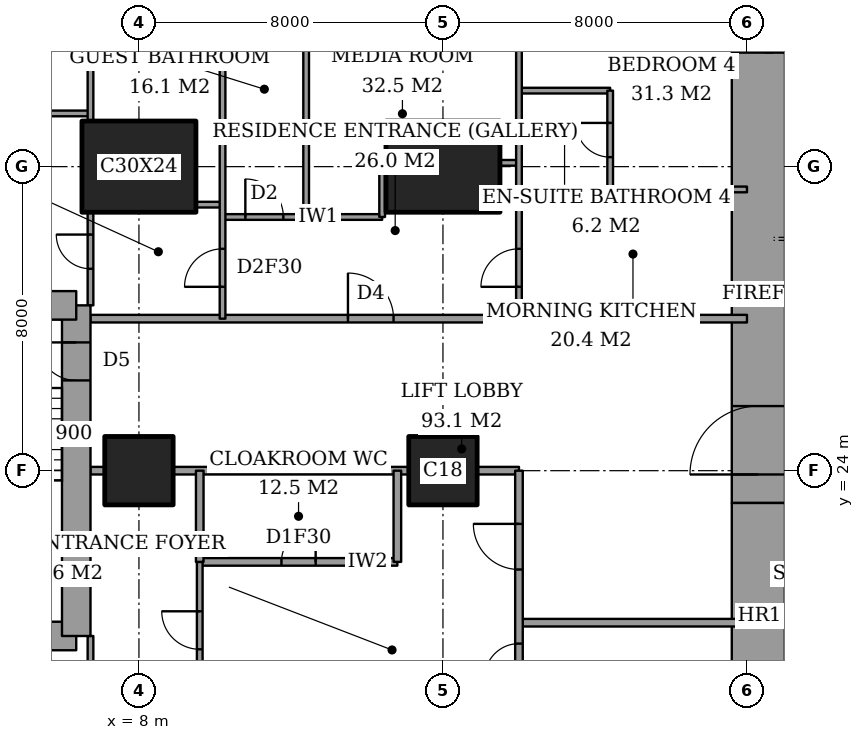
"""IFC4 building model, lengths in metres.
Left out: names, types, materials, properties, quantities, classifications, styles, units other than length and angle.
Written with IfcOpenShell. Run it as: python <this file> out.ifc"""

import sys

from ifc_helpers import new_model, si_unit, direction, frame, frame_2d, origin, origin_2d, place, context, subcontext, project, spatial, rectangle, extrude, element, fill, save


model = new_model("IFC4")
c1 = context("Model", 3, precision=1e-05, world=origin(), true_north=direction((0.0, 1.0)))
c2 = subcontext(c1, "Body", "Model", "MODEL_VIEW")
j1 = project(units=[si_unit("LENGTHUNIT", "METRE"), si_unit("PLANEANGLEUNIT", "RADIAN")], contexts=[c1])
p1 = place(None, origin())
s1 = spatial("IfcSite", under=j1, at=p1, CompositionType="ELEMENT")
p2 = place(p1, origin())
s2 = spatial("IfcBuilding", under=s1, at=p2, CompositionType="ELEMENT")
p3 = place(p2, frame((0.0, 0.0, 196.6)))
s3 = spatial("IfcBuildingStorey", under=s2, at=p3, CompositionType="ELEMENT", Elevation=196.6)
p4 = place(p3, frame((8.0, 24.0, 0.0), z_axis=(0.0, 0.0, 1.0), x_axis=(1.0, 0.0, 0.0)))
e1 = element("IfcColumn", 1, at=p4, inside=s3, PredefinedType="COLUMN", context=c2, shape_type="SweptSolid", body=[
    extrude(rectangle(XDim=1.8, YDim=1.8, at=origin_2d()), origin(), (0.0, 0.0, 1.0), 3.6),
])
p5 = place(p3, frame((8.0, 32.0, 0.0), z_axis=(0.0, 0.0, 1.0), x_axis=(1.0, 0.0, 0.0)))
e2 = element("IfcColumn", 2, at=p5, inside=s3, PredefinedType="COLUMN", context=c2, shape_type="SweptSolid", body=[
    extrude(rectangle(XDim=3.0, YDim=2.4, at=origin_2d()), origin(), (0.0, 0.0, 1.0), 3.6),
])
p6 = place(p3, frame((16.0, 24.0, 0.0), z_axis=(0.0, 0.0, 1.0), x_axis=(1.0, 0.0, 0.0)))
e3 = element("IfcColumn", 3, at=p6, inside=s3, PredefinedType="COLUMN", context=c2, shape_type="SweptSolid", body=[
    extrude(rectangle(XDim=1.8, YDim=1.8, at=origin_2d()), origin(), (0.0, 0.0, 1.0), 3.6),
])
p7 = place(p3, frame((16.0, 32.0, 0.0), z_axis=(0.0, 0.0, 1.0), x_axis=(1.0, 0.0, 0.0)))
e4 = element("IfcColumn", 4, at=p7, inside=s3, PredefinedType="COLUMN", context=c2, shape_type="SweptSolid", body=[
    extrude(rectangle(XDim=3.0, YDim=2.4, at=origin_2d()), origin(), (0.0, 0.0, 1.0), 3.6),
])
p8 = place(p3, frame((24.3, 13.0, 0.0), z_axis=(0.0, 0.0, 1.0), x_axis=(0.0, 1.0, 0.0)))
e5 = element("IfcWall", 5, at=p8, inside=s3, PredefinedType="SHEAR", context=c2, shape_type="SweptSolid", body=[
    extrude(rectangle(XDim=10.15, YDim=1.4, at=frame_2d((5.075, 0.0))), origin(), (0.0, 0.0, 1.0), 3.6),
])
p9 = place(p3, frame((24.3, 23.15, 0.0), z_axis=(0.0, 0.0, 1.0), x_axis=(0.0, 1.0, 0.0)))
e6 = element("IfcWall", 6, at=p9, inside=s3, PredefinedType="SHEAR", context=c2, shape_type="SweptSolid", body=[
    extrude(rectangle(XDim=11.85, YDim=1.4, at=frame_2d((5.925, 0.0))), origin(), (0.0, 0.0, 1.0), 3.6),
])
p10 = place(p9, frame((0.75, 0.0, 0.0)))
e7 = element("IfcOpeningElement", 7, at=p10, cuts=e6, PredefinedType="OPENING", context=c2, shape_type="SweptSolid", body=[
    extrude(rectangle(XDim=1.8, YDim=2.4, at=frame_2d((0.9, 1.2))), frame((0.0, 0.71, 0.0), z_axis=(0.0, -1.0, 0.0), x_axis=(1.0, 0.0, 0.0)), (0.0, 0.0, 1.0), 1.42),
])
p11 = place(p3, frame((1.9, 19.65, 0.0), z_axis=(0.0, 0.0, 1.0), x_axis=(1.0, 0.0, 0.0)))
e8 = element("IfcWall", 8, at=p11, inside=s3, PredefinedType="SHEAR", context=c2, shape_type="SweptSolid", body=[
    extrude(rectangle(XDim=4.45, YDim=0.75, at=frame_2d((2.225, 0.0))), origin(), (0.0, 0.0, 1.0), 3.6),
])
p12 = place(p3, frame((6.35, 19.65, 0.0), z_axis=(0.0, 0.0, 1.0), x_axis=(0.0, 1.0, 0.0)))
e9 = element("IfcWall", 9, at=p12, inside=s3, PredefinedType="SHEAR", context=c2, shape_type="SweptSolid", body=[
    extrude(rectangle(XDim=8.7, YDim=0.75, at=frame_2d((4.35, 0.0))), origin(), (0.0, 0.0, 1.0), 3.6),
])
p13 = place(p12, frame((6.725, 0.0, 0.0)))
e10 = element("IfcOpeningElement", 10, at=p13, cuts=e9, PredefinedType="OPENING", context=c2, shape_type="SweptSolid", body=[
    extrude(rectangle(XDim=1.0, YDim=2.1, at=frame_2d((0.5, 1.05))), frame((0.0, 0.385, 0.0), z_axis=(0.0, -1.0, 0.0), x_axis=(1.0, 0.0, 0.0)), (0.0, 0.0, 1.0), 0.77),
])
p14 = place(p3, frame((6.35, 28.35, 0.0), z_axis=(0.0, 0.0, 1.0), x_axis=(-1.0, 0.0, 0.0)))
e11 = element("IfcWall", 11, at=p14, inside=s3, PredefinedType="SHEAR", context=c2, shape_type="SweptSolid", body=[
    extrude(rectangle(XDim=4.45, YDim=0.75, at=frame_2d((2.225, 0.0))), origin(), (0.0, 0.0, 1.0), 3.6),
])
p15 = place(p3, frame((18.0, 20.0, 0.0), z_axis=(0.0, 0.0, 1.0), x_axis=(1.0, 0.0, 0.0)))
e12 = element("IfcWall", 12, at=p15, inside=s3, PredefinedType="PARTITIONING", context=c2, shape_type="SweptSolid", body=[
    extrude(rectangle(XDim=6.0, YDim=0.2, at=frame_2d((3.0, 0.0))), origin(), (0.0, 0.0, 1.0), 3.35),
])
p16 = place(p3, frame((9.6, 21.6, 0.0), z_axis=(0.0, 0.0, 1.0), x_axis=(1.0, 0.0, 0.0)))
e13 = element("IfcWall", 13, at=p16, inside=s3, PredefinedType="PARTITIONING", context=c2, shape_type="SweptSolid", body=[
    extrude(rectangle(XDim=5.2, YDim=0.2, at=frame_2d((2.6, 0.0))), origin(), (0.0, 0.0, 1.0), 3.35),
])
p17 = place(p16, frame((2.15, 0.0, 0.0)))
e14 = element("IfcOpeningElement", 14, at=p17, cuts=e13, PredefinedType="OPENING", context=c2, shape_type="SweptSolid", body=[
    extrude(rectangle(XDim=0.9, YDim=2.1, at=frame_2d((0.45, 1.05))), frame((0.0, 0.11, 0.0), z_axis=(0.0, -1.0, 0.0), x_axis=(1.0, 0.0, 0.0)), (0.0, 0.0, 1.0), 0.22),
])
p18 = place(p3, frame((6.725, 24.0, 0.0), z_axis=(0.0, 0.0, 1.0), x_axis=(1.0, 0.0, 0.0)))
e15 = element("IfcWall", 15, at=p18, inside=s3, PredefinedType="PARTITIONING", context=c2, shape_type="SweptSolid", body=[
    extrude(rectangle(XDim=0.375, YDim=0.2, at=frame_2d((0.188, 0.0))), origin(), (0.0, 0.0, 1.0), 3.35),
])
p19 = place(p3, frame((8.9, 24.0, 0.0), z_axis=(0.0, 0.0, 1.0), x_axis=(1.0, 0.0, 0.0)))
e16 = element("IfcWall", 16, at=p19, inside=s3, PredefinedType="PARTITIONING", context=c2, shape_type="SweptSolid", body=[
    extrude(rectangle(XDim=6.2, YDim=0.2, at=frame_2d((3.1, 0.0))), origin(), (0.0, 0.0, 1.0), 3.35),
])
p20 = place(p3, frame((16.9, 24.0, 0.0), z_axis=(0.0, 0.0, 1.0), x_axis=(1.0, 0.0, 0.0)))
e17 = element("IfcWall", 17, at=p20, inside=s3, PredefinedType="PARTITIONING", context=c2, shape_type="SweptSolid", body=[
    extrude(rectangle(XDim=1.1, YDim=0.2, at=frame_2d((0.55, 0.0))), origin(), (0.0, 0.0, 1.0), 3.35),
])
p21 = place(p3, frame((6.725, 28.0, 0.0), z_axis=(0.0, 0.0, 1.0), x_axis=(1.0, 0.0, 0.0)))
e18 = element("IfcWall", 18, at=p21, inside=s3, PredefinedType="PARTITIONING", context=c2, shape_type="SweptSolid", body=[
    extrude(rectangle(XDim=17.275, YDim=0.2, at=frame_2d((8.637, 0.0))), origin(), (0.0, 0.0, 1.0), 3.35),
])
p22 = place(p21, frame((6.775, 0.0, 0.0)))
e19 = element("IfcOpeningElement", 19, at=p22, cuts=e18, PredefinedType="OPENING", context=c2, shape_type="SweptSolid", body=[
    extrude(rectangle(XDim=1.2, YDim=2.4, at=frame_2d((0.6, 1.2))), frame((0.0, 0.11, 0.0), z_axis=(0.0, -1.0, 0.0), x_axis=(1.0, 0.0, 0.0)), (0.0, 0.0, 1.0), 0.22),
])
p23 = place(p3, frame((10.2, 30.675, 0.0), z_axis=(0.0, 0.0, 1.0), x_axis=(1.0, 0.0, 0.0)))
e20 = element("IfcWall", 20, at=p23, inside=s3, PredefinedType="PARTITIONING", context=c2, shape_type="SweptSolid", body=[
    extrude(rectangle(XDim=4.2, YDim=0.15, at=frame_2d((2.1, 0.0))), origin(), (0.0, 0.0, 1.0), 3.35),
])
p24 = place(p23, frame((0.6, 0.0, 0.0)))
e21 = element("IfcOpeningElement", 21, at=p24, cuts=e20, PredefinedType="OPENING", context=c2, shape_type="SweptSolid", body=[
    extrude(rectangle(XDim=1.0, YDim=2.1, at=frame_2d((0.5, 1.05))), frame((0.0, 0.085, 0.0), z_axis=(0.0, -1.0, 0.0), x_axis=(1.0, 0.0, 0.0)), (0.0, 0.0, 1.0), 0.17),
])
p25 = place(p3, frame((9.5, 31.0, 0.0), z_axis=(0.0, 0.0, 1.0), x_axis=(1.0, 0.0, 0.0)))
e22 = element("IfcWall", 22, at=p25, inside=s3, PredefinedType="PARTITIONING", context=c2, shape_type="SweptSolid", body=[
    extrude(rectangle(XDim=0.7, YDim=0.15, at=frame_2d((0.35, 0.0))), origin(), (0.0, 0.0, 1.0), 3.35),
])
p26 = place(p3, frame((18.0, 31.4, 0.0), z_axis=(0.0, 0.0, 1.0), x_axis=(1.0, 0.0, 0.0)))
e23 = element("IfcWall", 23, at=p26, inside=s3, PredefinedType="PARTITIONING", context=c2, shape_type="SweptSolid", body=[
    extrude(rectangle(XDim=6.0, YDim=0.15, at=frame_2d((3.0, 0.0))), origin(), (0.0, 0.0, 1.0), 3.35),
])
p27 = place(p3, frame((17.5, 32.1, 0.0), z_axis=(0.0, 0.0, 1.0), x_axis=(1.0, 0.0, 0.0)))
e24 = element("IfcWall", 24, at=p27, inside=s3, PredefinedType="PARTITIONING", context=c2, shape_type="SweptSolid", body=[
    extrude(rectangle(XDim=0.5, YDim=0.15, at=frame_2d((0.25, 0.0))), origin(), (0.0, 0.0, 1.0), 3.35),
])
p28 = place(p3, frame((-0.45, 33.4, 0.0), z_axis=(0.0, 0.0, 1.0), x_axis=(1.0, 0.0, 0.0)))
e25 = element("IfcWall", 25, at=p28, inside=s3, PredefinedType="PARTITIONING", context=c2, shape_type="SweptSolid", body=[
    extrude(rectangle(XDim=7.175, YDim=0.15, at=frame_2d((3.587, 0.0))), origin(), (0.0, 0.0, 1.0), 3.35),
])
p29 = place(p3, frame((18.0, 34.0, 0.0), z_axis=(0.0, 0.0, 1.0), x_axis=(1.0, 0.0, 0.0)))
e26 = element("IfcWall", 26, at=p29, inside=s3, PredefinedType="PARTITIONING", context=c2, shape_type="SweptSolid", body=[
    extrude(rectangle(XDim=2.4, YDim=0.15, at=frame_2d((1.2, 0.0))), origin(), (0.0, 0.0, 1.0), 3.35),
])
p30 = place(p3, frame((6.725, 17.2, 0.0), z_axis=(0.0, 0.0, 1.0), x_axis=(0.0, 1.0, 0.0)))
e27 = element("IfcWall", 27, at=p30, inside=s3, PredefinedType="PARTITIONING", context=c2, shape_type="SweptSolid", body=[
    extrude(rectangle(XDim=2.45, YDim=0.15, at=frame_2d((1.225, 0.0))), origin(), (0.0, 0.0, 1.0), 3.35),
])
p31 = place(p30, frame((0.587, 0.0, 0.0)))
e28 = element("IfcOpeningElement", 28, at=p31, cuts=e27, PredefinedType="OPENING", context=c2, shape_type="SweptSolid", body=[
    extrude(rectangle(XDim=0.9, YDim=2.1, at=frame_2d((0.45, 1.05))), frame((0.0, 0.085, 0.0), z_axis=(0.0, -1.0, 0.0), x_axis=(1.0, 0.0, 0.0)), (0.0, 0.0, 1.0), 0.17),
])
p32 = place(p3, frame((6.725, 28.35, 0.0), z_axis=(0.0, 0.0, 1.0), x_axis=(0.0, 1.0, 0.0)))
e29 = element("IfcWall", 29, at=p32, inside=s3, PredefinedType="PARTITIONING", context=c2, shape_type="SweptSolid", body=[
    extrude(rectangle(XDim=2.45, YDim=0.15, at=frame_2d((1.225, 0.0))), origin(), (0.0, 0.0, 1.0), 3.35),
])
p33 = place(p32, frame((0.962, 0.0, 0.0)))
e30 = element("IfcOpeningElement", 30, at=p33, cuts=e29, PredefinedType="OPENING", context=c2, shape_type="SweptSolid", body=[
    extrude(rectangle(XDim=0.9, YDim=2.1, at=frame_2d((0.45, 1.05))), frame((0.0, 0.085, 0.0), z_axis=(0.0, -1.0, 0.0), x_axis=(1.0, 0.0, 0.0)), (0.0, 0.0, 1.0), 0.17),
])
p34 = place(p3, frame((6.725, 33.2, 0.0), z_axis=(0.0, 0.0, 1.0), x_axis=(0.0, 1.0, 0.0)))
e31 = element("IfcWall", 31, at=p34, inside=s3, PredefinedType="PARTITIONING", context=c2, shape_type="SweptSolid", body=[
    extrude(rectangle(XDim=4.2, YDim=0.15, at=frame_2d((2.1, 0.0))), origin(), (0.0, 0.0, 1.0), 3.35),
])
p35 = place(p3, frame((9.6, 21.6, 0.0), z_axis=(0.0, 0.0, 1.0), x_axis=(0.0, 1.0, 0.0)))
e32 = element("IfcWall", 32, at=p35, inside=s3, PredefinedType="PARTITIONING", context=c2, shape_type="SweptSolid", body=[
    extrude(rectangle(XDim=2.4, YDim=0.2, at=frame_2d((1.2, 0.0))), origin(), (0.0, 0.0, 1.0), 3.35),
])
p36 = place(p3, frame((9.6, 10.6, 0.0), z_axis=(0.0, 0.0, 1.0), x_axis=(0.0, 1.0, 0.0)))
e33 = element("IfcWall", 33, at=p36, inside=s3, PredefinedType="PARTITIONING", context=c2, shape_type="SweptSolid", body=[
    extrude(rectangle(XDim=11.0, YDim=0.15, at=frame_2d((5.5, 0.0))), origin(), (0.0, 0.0, 1.0), 3.35),
])
p37 = place(p36, frame((8.7, 0.0, 0.0)))
e34 = element("IfcOpeningElement", 34, at=p37, cuts=e33, PredefinedType="OPENING", context=c2, shape_type="SweptSolid", body=[
    extrude(rectangle(XDim=1.0, YDim=2.1, at=frame_2d((0.5, 1.05))), frame((0.0, 0.085, 0.0), z_axis=(0.0, -1.0, 0.0), x_axis=(1.0, 0.0, 0.0)), (0.0, 0.0, 1.0), 0.17),
])
p38 = place(p3, frame((10.2, 28.0, 0.0), z_axis=(0.0, 0.0, 1.0), x_axis=(0.0, 1.0, 0.0)))
e35 = element("IfcWall", 35, at=p38, inside=s3, PredefinedType="PARTITIONING", context=c2, shape_type="SweptSolid", body=[
    extrude(rectangle(XDim=9.4, YDim=0.15, at=frame_2d((4.7, 0.0))), origin(), (0.0, 0.0, 1.0), 3.35),
])
p39 = place(p38, frame((0.837, 0.0, 0.0)))
e36 = element("IfcOpeningElement", 36, at=p39, cuts=e35, PredefinedType="OPENING", context=c2, shape_type="SweptSolid", body=[
    extrude(rectangle(XDim=1.0, YDim=2.1, at=frame_2d((0.5, 1.05))), frame((0.0, 0.085, 0.0), z_axis=(0.0, -1.0, 0.0), x_axis=(1.0, 0.0, 0.0)), (0.0, 0.0, 1.0), 0.17),
])
p40 = place(p3, frame((12.4, 30.675, 0.0), z_axis=(0.0, 0.0, 1.0), x_axis=(0.0, 1.0, 0.0)))
e37 = element("IfcWall", 37, at=p40, inside=s3, PredefinedType="PARTITIONING", context=c2, shape_type="SweptSolid", body=[
    extrude(rectangle(XDim=6.725, YDim=0.15, at=frame_2d((3.362, 0.0))), origin(), (0.0, 0.0, 1.0), 3.35),
])
p41 = place(p3, frame((14.4, 30.675, 0.0), z_axis=(0.0, 0.0, 1.0), x_axis=(0.0, 1.0, 0.0)))
e38 = element("IfcWall", 38, at=p41, inside=s3, PredefinedType="PARTITIONING", context=c2, shape_type="SweptSolid", body=[
    extrude(rectangle(XDim=1.425, YDim=0.15, at=frame_2d((0.712, 0.0))), origin(), (0.0, 0.0, 1.0), 3.35),
])
p42 = place(p3, frame((14.8, 21.6, 0.0), z_axis=(0.0, 0.0, 1.0), x_axis=(0.0, 1.0, 0.0)))
e39 = element("IfcWall", 39, at=p42, inside=s3, PredefinedType="PARTITIONING", context=c2, shape_type="SweptSolid", body=[
    extrude(rectangle(XDim=2.4, YDim=0.2, at=frame_2d((1.2, 0.0))), origin(), (0.0, 0.0, 1.0), 3.35),
])
p43 = place(p3, frame((18.0, 18.0, 0.0), z_axis=(0.0, 0.0, 1.0), x_axis=(0.0, 1.0, 0.0)))
e40 = element("IfcWall", 40, at=p43, inside=s3, PredefinedType="PARTITIONING", context=c2, shape_type="SweptSolid", body=[
    extrude(rectangle(XDim=6.0, YDim=0.2, at=frame_2d((3.0, 0.0))), origin(), (0.0, 0.0, 1.0), 3.35),
])
p44 = place(p43, frame((3.4, 0.0, 0.0)))
e41 = element("IfcOpeningElement", 41, at=p44, cuts=e40, PredefinedType="OPENING", context=c2, shape_type="SweptSolid", body=[
    extrude(rectangle(XDim=1.2, YDim=2.4, at=frame_2d((0.6, 1.2))), frame((0.0, 0.11, 0.0), z_axis=(0.0, -1.0, 0.0), x_axis=(1.0, 0.0, 0.0)), (0.0, 0.0, 1.0), 0.22),
])
p45 = place(p43, frame((0.55, 0.0, 0.0)))
e42 = element("IfcOpeningElement", 42, at=p45, cuts=e40, PredefinedType="OPENING", context=c2, shape_type="SweptSolid", body=[
    extrude(rectangle(XDim=0.9, YDim=2.1, at=frame_2d((0.45, 1.05))), frame((0.0, 0.11, 0.0), z_axis=(0.0, -1.0, 0.0), x_axis=(1.0, 0.0, 0.0)), (0.0, 0.0, 1.0), 0.22),
])
p46 = place(p3, frame((18.0, 28.0, 0.0), z_axis=(0.0, 0.0, 1.0), x_axis=(0.0, 1.0, 0.0)))
e43 = element("IfcWall", 43, at=p46, inside=s3, PredefinedType="PARTITIONING", context=c2, shape_type="SweptSolid", body=[
    extrude(rectangle(XDim=9.4, YDim=0.15, at=frame_2d((4.7, 0.0))), origin(), (0.0, 0.0, 1.0), 3.35),
])
p47 = place(p46, frame((0.837, 0.0, 0.0)))
e44 = element("IfcOpeningElement", 44, at=p47, cuts=e43, PredefinedType="OPENING", context=c2, shape_type="SweptSolid", body=[
    extrude(rectangle(XDim=1.0, YDim=2.1, at=frame_2d((0.5, 1.05))), frame((0.0, 0.085, 0.0), z_axis=(0.0, -1.0, 0.0), x_axis=(1.0, 0.0, 0.0)), (0.0, 0.0, 1.0), 0.17),
])
p48 = place(p3, frame((20.4, 31.4, 0.0), z_axis=(0.0, 0.0, 1.0), x_axis=(0.0, 1.0, 0.0)))
e45 = element("IfcWall", 45, at=p48, inside=s3, PredefinedType="PARTITIONING", context=c2, shape_type="SweptSolid", body=[
    extrude(rectangle(XDim=2.6, YDim=0.15, at=frame_2d((1.3, 0.0))), origin(), (0.0, 0.0, 1.0), 3.35),
])
p49 = place(p48, frame((0.85, 0.0, 0.0)))
e46 = element("IfcOpeningElement", 46, at=p49, cuts=e45, PredefinedType="OPENING", context=c2, shape_type="SweptSolid", body=[
    extrude(rectangle(XDim=0.9, YDim=2.1, at=frame_2d((0.45, 1.05))), frame((0.0, 0.085, 0.0), z_axis=(0.0, -1.0, 0.0), x_axis=(1.0, 0.0, 0.0)), (0.0, 0.0, 1.0), 0.17),
])
p50 = place(p37, origin())
e47 = element("IfcDoor", 47, at=p50, inside=s3, OperationType="SINGLE_SWING_LEFT", PredefinedType="DOOR", context=c2, shape_type="SweptSolid", body=[
    extrude(rectangle(XDim=1.0, YDim=2.1, at=frame_2d((0.5, 1.05))), frame((0.0, 0.025, 0.0), z_axis=(0.0, -1.0, 0.0), x_axis=(1.0, 0.0, 0.0)), (0.0, 0.0, 1.0), 0.05),
])
fill(e34, e47)
p51 = place(p17, origin())
e48 = element("IfcDoor", 48, at=p51, inside=s3, OperationType="SINGLE_SWING_LEFT", PredefinedType="DOOR", context=c2, shape_type="SweptSolid", body=[
    extrude(rectangle(XDim=0.9, YDim=2.1, at=frame_2d((0.45, 1.05))), frame((0.0, 0.025, 0.0), z_axis=(0.0, -1.0, 0.0), x_axis=(1.0, 0.0, 0.0)), (0.0, 0.0, 1.0), 0.05),
])
fill(e14, e48)
p52 = place(p44, origin())
e49 = element("IfcDoor", 49, at=p52, inside=s3, OperationType="SINGLE_SWING_LEFT", PredefinedType="DOOR", context=c2, shape_type="SweptSolid", body=[
    extrude(rectangle(XDim=1.2, YDim=2.4, at=frame_2d((0.6, 1.2))), frame((0.0, 0.025, 0.0), z_axis=(0.0, -1.0, 0.0), x_axis=(1.0, 0.0, 0.0)), (0.0, 0.0, 1.0), 0.05),
])
fill(e41, e49)
p53 = place(p45, origin())
e50 = element("IfcDoor", 50, at=p53, inside=s3, OperationType="SINGLE_SWING_RIGHT", PredefinedType="DOOR", context=c2, shape_type="SweptSolid", body=[
    extrude(rectangle(XDim=0.9, YDim=2.1, at=frame_2d((0.45, 1.05))), frame((0.0, 0.025, 0.0), z_axis=(0.0, -1.0, 0.0), x_axis=(1.0, 0.0, 0.0)), (0.0, 0.0, 1.0), 0.05),
])
fill(e42, e50)
p54 = place(p33, origin())
e51 = element("IfcDoor", 51, at=p54, inside=s3, OperationType="SINGLE_SWING_LEFT", PredefinedType="DOOR", context=c2, shape_type="SweptSolid", body=[
    extrude(rectangle(XDim=0.9, YDim=2.1, at=frame_2d((0.45, 1.05))), frame((0.0, 0.025, 0.0), z_axis=(0.0, -1.0, 0.0), x_axis=(1.0, 0.0, 0.0)), (0.0, 0.0, 1.0), 0.05),
])
fill(e30, e51)
p55 = place(p39, origin())
e52 = element("IfcDoor", 52, at=p55, inside=s3, OperationType="SINGLE_SWING_RIGHT", PredefinedType="DOOR", context=c2, shape_type="SweptSolid", body=[
    extrude(rectangle(XDim=1.0, YDim=2.1, at=frame_2d((0.5, 1.05))), frame((0.0, 0.025, 0.0), z_axis=(0.0, -1.0, 0.0), x_axis=(1.0, 0.0, 0.0)), (0.0, 0.0, 1.0), 0.05),
])
fill(e36, e52)
p56 = place(p22, origin())
e53 = element("IfcDoor", 53, at=p56, inside=s3, OperationType="SINGLE_SWING_RIGHT", PredefinedType="DOOR", context=c2, shape_type="SweptSolid", body=[
    extrude(rectangle(XDim=1.2, YDim=2.4, at=frame_2d((0.6, 1.2))), frame((0.0, 0.025, 0.0), z_axis=(0.0, -1.0, 0.0), x_axis=(1.0, 0.0, 0.0)), (0.0, 0.0, 1.0), 0.05),
])
fill(e19, e53)
p57 = place(p24, origin())
e54 = element("IfcDoor", 54, at=p57, inside=s3, OperationType="SINGLE_SWING_RIGHT", PredefinedType="DOOR", context=c2, shape_type="SweptSolid", body=[
    extrude(rectangle(XDim=1.0, YDim=2.1, at=frame_2d((0.5, 1.05))), frame((0.0, 0.025, 0.0), z_axis=(0.0, -1.0, 0.0), x_axis=(1.0, 0.0, 0.0)), (0.0, 0.0, 1.0), 0.05),
])
fill(e21, e54)
p58 = place(p49, origin())
e55 = element("IfcDoor", 55, at=p58, inside=s3, OperationType="SINGLE_SWING_LEFT", PredefinedType="DOOR", context=c2, shape_type="SweptSolid", body=[
    extrude(rectangle(XDim=0.9, YDim=2.1, at=frame_2d((0.45, 1.05))), frame((0.0, 0.025, 0.0), z_axis=(0.0, -1.0, 0.0), x_axis=(1.0, 0.0, 0.0)), (0.0, 0.0, 1.0), 0.05),
])
fill(e46, e55)
p59 = place(p47, origin())
e56 = element("IfcDoor", 56, at=p59, inside=s3, OperationType="SINGLE_SWING_RIGHT", PredefinedType="DOOR", context=c2, shape_type="SweptSolid", body=[
    extrude(rectangle(XDim=1.0, YDim=2.1, at=frame_2d((0.5, 1.05))), frame((0.0, 0.025, 0.0), z_axis=(0.0, -1.0, 0.0), x_axis=(1.0, 0.0, 0.0)), (0.0, 0.0, 1.0), 0.05),
])
fill(e44, e56)
p60 = place(p10, origin())
e57 = element("IfcDoor", 57, at=p60, inside=s3, OperationType="DOUBLE_DOOR_DOUBLE_SWING", PredefinedType="DOOR", context=c2, shape_type="SweptSolid", body=[
    extrude(rectangle(XDim=1.8, YDim=2.4, at=frame_2d((0.9, 1.2))), frame((0.0, 0.025, 0.0), z_axis=(0.0, -1.0, 0.0), x_axis=(1.0, 0.0, 0.0)), (0.0, 0.0, 1.0), 0.05),
])
fill(e7, e57)
p61 = place(p13, origin())
e58 = element("IfcDoor", 58, at=p61, inside=s3, OperationType="SINGLE_SWING_LEFT", PredefinedType="DOOR", context=c2, shape_type="SweptSolid", body=[
    extrude(rectangle(XDim=1.0, YDim=2.1, at=frame_2d((0.5, 1.05))), frame((0.0, 0.025, 0.0), z_axis=(0.0, -1.0, 0.0), x_axis=(1.0, 0.0, 0.0)), (0.0, 0.0, 1.0), 0.05),
])
fill(e10, e58)
save(model, sys.argv[1])
